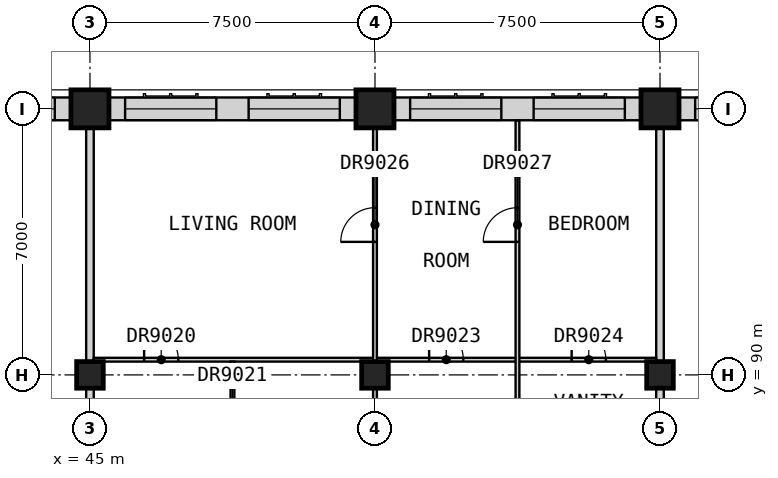
"""IFC4 building model, lengths in metres.
Left out: names, types, materials, properties, quantities, classifications, styles, units other than length and angle.
Written with IfcOpenShell. Run it as: python <this file> out.ifc"""

import sys

from ifc_helpers import new_model, si_unit, direction, frame, frame_2d, origin, origin_2d, place, context, subcontext, project, spatial, rectangle, extrude, element, fill, save


model = new_model("IFC4")
c1 = context("Model", 3, precision=1e-05, world=origin(), true_north=direction((0.0, 1.0)))
c2 = subcontext(c1, "Body", "Model", "MODEL_VIEW")
j1 = project(units=[si_unit("LENGTHUNIT", "METRE"), si_unit("PLANEANGLEUNIT", "RADIAN")], contexts=[c1])
p1 = place(None, origin())
s1 = spatial("IfcSite", under=j1, at=p1, CompositionType="ELEMENT")
p2 = place(p1, origin())
s2 = spatial("IfcBuilding", under=s1, at=p2, CompositionType="ELEMENT")
p3 = place(p2, frame((0.0, 0.0, 269.7)))
s3 = spatial("IfcBuildingStorey", under=s2, at=p3, CompositionType="ELEMENT", Elevation=269.7)
p4 = place(p3, frame((45.0, 90.0, 0.0), z_axis=(0.0, 0.0, 1.0), x_axis=(1.0, 0.0, 0.0)))
e1 = element("IfcColumn", 1, at=p4, inside=s3, PredefinedType="COLUMN", context=c2, shape_type="SweptSolid", body=[
    extrude(rectangle(XDim=0.7, YDim=0.7, at=origin_2d()), origin(), (0.0, 0.0, 1.0), 3.5),
])
p5 = place(p3, frame((45.0, 97.0, 0.0), z_axis=(0.0, 0.0, 1.0), x_axis=(1.0, 0.0, 0.0)))
e2 = element("IfcColumn", 2, at=p5, inside=s3, PredefinedType="COLUMN", context=c2, shape_type="SweptSolid", body=[
    extrude(rectangle(XDim=1.0, YDim=1.0, at=origin_2d()), origin(), (0.0, 0.0, 1.0), 3.5),
])
p6 = place(p3, frame((52.5, 90.0, 0.0), z_axis=(0.0, 0.0, 1.0), x_axis=(1.0, 0.0, 0.0)))
e3 = element("IfcColumn", 3, at=p6, inside=s3, PredefinedType="COLUMN", context=c2, shape_type="SweptSolid", body=[
    extrude(rectangle(XDim=0.7, YDim=0.7, at=origin_2d()), origin(), (0.0, 0.0, 1.0), 3.5),
])
p7 = place(p3, frame((52.5, 97.0, 0.0), z_axis=(0.0, 0.0, 1.0), x_axis=(1.0, 0.0, 0.0)))
e4 = element("IfcColumn", 4, at=p7, inside=s3, PredefinedType="COLUMN", context=c2, shape_type="SweptSolid", body=[
    extrude(rectangle(XDim=1.0, YDim=1.0, at=origin_2d()), origin(), (0.0, 0.0, 1.0), 3.5),
])
p8 = place(p3, frame((60.0, 90.0, 0.0), z_axis=(0.0, 0.0, 1.0), x_axis=(1.0, 0.0, 0.0)))
e5 = element("IfcColumn", 5, at=p8, inside=s3, PredefinedType="COLUMN", context=c2, shape_type="SweptSolid", body=[
    extrude(rectangle(XDim=0.7, YDim=0.7, at=origin_2d()), origin(), (0.0, 0.0, 1.0), 3.5),
])
p9 = place(p3, frame((60.0, 97.0, 0.0), z_axis=(0.0, 0.0, 1.0), x_axis=(1.0, 0.0, 0.0)))
e6 = element("IfcColumn", 6, at=p9, inside=s3, PredefinedType="COLUMN", context=c2, shape_type="SweptSolid", body=[
    extrude(rectangle(XDim=1.0, YDim=1.0, at=origin_2d()), origin(), (0.0, 0.0, 1.0), 3.5),
])
p10 = place(p3, frame((67.0, 97.0, 0.0), z_axis=(0.0, 0.0, 1.0), x_axis=(-1.0, 0.0, 0.0)))
e7 = element("IfcWall", 7, at=p10, inside=s3, PredefinedType="SOLIDWALL", context=c2, shape_type="SweptSolid", body=[
    extrude(rectangle(XDim=6.5, YDim=0.6, at=frame_2d((3.25, 0.0))), origin(), (0.0, 0.0, 1.0), 2.75),
])
p11 = place(p10, frame((3.675, 0.0, 0.8)))
e8 = element("IfcOpeningElement", 8, at=p11, cuts=e7, PredefinedType="OPENING", context=c2, shape_type="SweptSolid", body=[
    extrude(rectangle(XDim=2.4, YDim=1.8, at=frame_2d((1.2, 0.9))), frame((0.0, 0.31, 0.0), z_axis=(0.0, -1.0, 0.0), x_axis=(1.0, 0.0, 0.0)), (0.0, 0.0, 1.0), 0.62),
])
p12 = place(p10, frame((0.425, 0.0, 0.8)))
e9 = element("IfcOpeningElement", 9, at=p12, cuts=e7, PredefinedType="OPENING", context=c2, shape_type="SweptSolid", body=[
    extrude(rectangle(XDim=2.4, YDim=1.8, at=frame_2d((1.2, 0.9))), frame((0.0, 0.31, 0.0), z_axis=(0.0, -1.0, 0.0), x_axis=(1.0, 0.0, 0.0)), (0.0, 0.0, 1.0), 0.62),
])
p13 = place(p3, frame((59.5, 97.0, 0.0), z_axis=(0.0, 0.0, 1.0), x_axis=(-1.0, 0.0, 0.0)))
e10 = element("IfcWall", 10, at=p13, inside=s3, PredefinedType="SOLIDWALL", context=c2, shape_type="SweptSolid", body=[
    extrude(rectangle(XDim=6.5, YDim=0.6, at=frame_2d((3.25, 0.0))), origin(), (0.0, 0.0, 1.0), 2.75),
])
p14 = place(p13, frame((3.675, 0.0, 0.8)))
e11 = element("IfcOpeningElement", 11, at=p14, cuts=e10, PredefinedType="OPENING", context=c2, shape_type="SweptSolid", body=[
    extrude(rectangle(XDim=2.4, YDim=1.8, at=frame_2d((1.2, 0.9))), frame((0.0, 0.31, 0.0), z_axis=(0.0, -1.0, 0.0), x_axis=(1.0, 0.0, 0.0)), (0.0, 0.0, 1.0), 0.62),
])
p15 = place(p13, frame((0.425, 0.0, 0.8)))
e12 = element("IfcOpeningElement", 12, at=p15, cuts=e10, PredefinedType="OPENING", context=c2, shape_type="SweptSolid", body=[
    extrude(rectangle(XDim=2.4, YDim=1.8, at=frame_2d((1.2, 0.9))), frame((0.0, 0.31, 0.0), z_axis=(0.0, -1.0, 0.0), x_axis=(1.0, 0.0, 0.0)), (0.0, 0.0, 1.0), 0.62),
])
p16 = place(p3, frame((52.0, 97.0, 0.0), z_axis=(0.0, 0.0, 1.0), x_axis=(-1.0, 0.0, 0.0)))
e13 = element("IfcWall", 13, at=p16, inside=s3, PredefinedType="SOLIDWALL", context=c2, shape_type="SweptSolid", body=[
    extrude(rectangle(XDim=6.5, YDim=0.6, at=frame_2d((3.25, 0.0))), origin(), (0.0, 0.0, 1.0), 2.75),
])
p17 = place(p16, frame((3.675, 0.0, 0.8)))
e14 = element("IfcOpeningElement", 14, at=p17, cuts=e13, PredefinedType="OPENING", context=c2, shape_type="SweptSolid", body=[
    extrude(rectangle(XDim=2.4, YDim=1.8, at=frame_2d((1.2, 0.9))), frame((0.0, 0.31, 0.0), z_axis=(0.0, -1.0, 0.0), x_axis=(1.0, 0.0, 0.0)), (0.0, 0.0, 1.0), 0.62),
])
p18 = place(p16, frame((0.425, 0.0, 0.8)))
e15 = element("IfcOpeningElement", 15, at=p18, cuts=e13, PredefinedType="OPENING", context=c2, shape_type="SweptSolid", body=[
    extrude(rectangle(XDim=2.4, YDim=1.8, at=frame_2d((1.2, 0.9))), frame((0.0, 0.31, 0.0), z_axis=(0.0, -1.0, 0.0), x_axis=(1.0, 0.0, 0.0)), (0.0, 0.0, 1.0), 0.62),
])
p19 = place(p3, frame((44.5, 97.0, 0.0), z_axis=(0.0, 0.0, 1.0), x_axis=(-1.0, 0.0, 0.0)))
e16 = element("IfcWall", 16, at=p19, inside=s3, PredefinedType="SOLIDWALL", context=c2, shape_type="SweptSolid", body=[
    extrude(rectangle(XDim=6.5, YDim=0.6, at=frame_2d((3.25, 0.0))), origin(), (0.0, 0.0, 1.0), 2.75),
])
p20 = place(p19, frame((3.675, 0.0, 0.8)))
e17 = element("IfcOpeningElement", 17, at=p20, cuts=e16, PredefinedType="OPENING", context=c2, shape_type="SweptSolid", body=[
    extrude(rectangle(XDim=2.4, YDim=1.8, at=frame_2d((1.2, 0.9))), frame((0.0, 0.31, 0.0), z_axis=(0.0, -1.0, 0.0), x_axis=(1.0, 0.0, 0.0)), (0.0, 0.0, 1.0), 0.62),
])
p21 = place(p19, frame((0.425, 0.0, 0.8)))
e18 = element("IfcOpeningElement", 18, at=p21, cuts=e16, PredefinedType="OPENING", context=c2, shape_type="SweptSolid", body=[
    extrude(rectangle(XDim=2.4, YDim=1.8, at=frame_2d((1.2, 0.9))), frame((0.0, 0.31, 0.0), z_axis=(0.0, -1.0, 0.0), x_axis=(1.0, 0.0, 0.0)), (0.0, 0.0, 1.0), 0.62),
])
for number, where, z_axis, x_axis in (
    (19, (45.0, 84.375, 0.0), (0.0, 0.0, 1.0), (0.0, 1.0, 0.0)),
    (20, (60.0, 84.375, 0.0), (0.0, 0.0, 1.0), (0.0, 1.0, 0.0)),
):
    element("IfcWall", number, at=place(p3, frame(where, z_axis=z_axis, x_axis=x_axis)), inside=s3, PredefinedType="PARTITIONING", context=c2, shape_type="SweptSolid", body=[
        extrude(rectangle(XDim=13.125, YDim=0.2, at=frame_2d((6.562, 0.0))), origin(), (0.0, 0.0, 1.0), 3.25),
    ])
p22 = place(p3, frame((45.1, 90.4, 0.0), z_axis=(0.0, 0.0, 1.0), x_axis=(1.0, 0.0, 0.0)))
e21 = element("IfcWall", 21, at=p22, inside=s3, PredefinedType="PARTITIONING", context=c2, shape_type="SweptSolid", body=[
    extrude(rectangle(XDim=14.8, YDim=0.1, at=frame_2d((7.4, 0.0))), origin(), (0.0, 0.0, 1.0), 3.25),
])
p23 = place(p22, frame((1.325, 0.0, 0.0)))
e22 = element("IfcOpeningElement", 22, at=p23, cuts=e21, PredefinedType="OPENING", context=c2, shape_type="SweptSolid", body=[
    extrude(rectangle(XDim=0.9, YDim=2.1, at=frame_2d((0.45, 1.05))), frame((0.0, 0.06, 0.0), z_axis=(0.0, -1.0, 0.0), x_axis=(1.0, 0.0, 0.0)), (0.0, 0.0, 1.0), 0.12),
])
p24 = place(p22, frame((8.825, 0.0, 0.0)))
e23 = element("IfcOpeningElement", 23, at=p24, cuts=e21, PredefinedType="OPENING", context=c2, shape_type="SweptSolid", body=[
    extrude(rectangle(XDim=0.9, YDim=2.1, at=frame_2d((0.45, 1.05))), frame((0.0, 0.06, 0.0), z_axis=(0.0, -1.0, 0.0), x_axis=(1.0, 0.0, 0.0)), (0.0, 0.0, 1.0), 0.12),
])
p25 = place(p22, frame((12.575, 0.0, 0.0)))
e24 = element("IfcOpeningElement", 24, at=p25, cuts=e21, PredefinedType="OPENING", context=c2, shape_type="SweptSolid", body=[
    extrude(rectangle(XDim=0.9, YDim=2.1, at=frame_2d((0.45, 1.05))), frame((0.0, 0.06, 0.0), z_axis=(0.0, -1.0, 0.0), x_axis=(1.0, 0.0, 0.0)), (0.0, 0.0, 1.0), 0.12),
])
p26 = place(p3, frame((48.75, 87.413, 0.0), z_axis=(0.0, 0.0, 1.0), x_axis=(0.0, 1.0, 0.0)))
e25 = element("IfcWall", 25, at=p26, inside=s3, PredefinedType="PARTITIONING", context=c2, shape_type="SweptSolid", body=[
    extrude(rectangle(XDim=2.938, YDim=0.1, at=frame_2d((1.469, 0.0))), origin(), (0.0, 0.0, 1.0), 3.25),
])
p27 = place(p26, frame((1.012, 0.0, 0.0)))
e26 = element("IfcOpeningElement", 26, at=p27, cuts=e25, PredefinedType="OPENING", context=c2, shape_type="SweptSolid", body=[
    extrude(rectangle(XDim=0.9, YDim=2.1, at=frame_2d((0.45, 1.05))), frame((0.0, 0.06, 0.0), z_axis=(0.0, -1.0, 0.0), x_axis=(1.0, 0.0, 0.0)), (0.0, 0.0, 1.0), 0.12),
])
p28 = place(p3, frame((52.5, 87.413, 0.0), z_axis=(0.0, 0.0, 1.0), x_axis=(0.0, 1.0, 0.0)))
e27 = element("IfcWall", 27, at=p28, inside=s3, PredefinedType="PARTITIONING", context=c2, shape_type="SweptSolid", body=[
    extrude(rectangle(XDim=10.087, YDim=0.1, at=frame_2d((5.044, 0.0))), origin(), (0.0, 0.0, 1.0), 3.25),
])
p29 = place(p28, frame((6.087, 0.0, 0.0)))
e28 = element("IfcOpeningElement", 28, at=p29, cuts=e27, PredefinedType="OPENING", context=c2, shape_type="SweptSolid", body=[
    extrude(rectangle(XDim=0.9, YDim=2.1, at=frame_2d((0.45, 1.05))), frame((0.0, 0.06, 0.0), z_axis=(0.0, -1.0, 0.0), x_axis=(1.0, 0.0, 0.0)), (0.0, 0.0, 1.0), 0.12),
])
p30 = place(p3, frame((56.25, 87.413, 0.0), z_axis=(0.0, 0.0, 1.0), x_axis=(0.0, 1.0, 0.0)))
e29 = element("IfcWall", 29, at=p30, inside=s3, PredefinedType="PARTITIONING", context=c2, shape_type="SweptSolid", body=[
    extrude(rectangle(XDim=9.277, YDim=0.1, at=frame_2d((4.639, 0.0))), origin(), (0.0, 0.0, 1.0), 3.25),
])
p31 = place(p30, frame((6.087, 0.0, 0.0)))
e30 = element("IfcOpeningElement", 30, at=p31, cuts=e29, PredefinedType="OPENING", context=c2, shape_type="SweptSolid", body=[
    extrude(rectangle(XDim=0.9, YDim=2.1, at=frame_2d((0.45, 1.05))), frame((0.0, 0.06, 0.0), z_axis=(0.0, -1.0, 0.0), x_axis=(1.0, 0.0, 0.0)), (0.0, 0.0, 1.0), 0.12),
])
p32 = place(p11, origin())
e31 = element("IfcWindow", 31, at=p32, inside=s3, PartitioningType="SINGLE_PANEL", PredefinedType="WINDOW", context=c2, shape_type="SweptSolid", body=[
    extrude(rectangle(XDim=2.4, YDim=1.8, at=frame_2d((1.2, 0.9))), frame((0.0, -0.07, 0.0), z_axis=(0.0, -1.0, 0.0), x_axis=(1.0, 0.0, 0.0)), (0.0, 0.0, 1.0), 0.06),
])
fill(e8, e31)
p33 = place(p14, origin())
e32 = element("IfcWindow", 32, at=p33, inside=s3, PartitioningType="SINGLE_PANEL", PredefinedType="WINDOW", context=c2, shape_type="SweptSolid", body=[
    extrude(rectangle(XDim=2.4, YDim=1.8, at=frame_2d((1.2, 0.9))), frame((0.0, -0.07, 0.0), z_axis=(0.0, -1.0, 0.0), x_axis=(1.0, 0.0, 0.0)), (0.0, 0.0, 1.0), 0.06),
])
fill(e11, e32)
p34 = place(p15, origin())
e33 = element("IfcWindow", 33, at=p34, inside=s3, PartitioningType="SINGLE_PANEL", PredefinedType="WINDOW", context=c2, shape_type="SweptSolid", body=[
    extrude(rectangle(XDim=2.4, YDim=1.8, at=frame_2d((1.2, 0.9))), frame((0.0, -0.07, 0.0), z_axis=(0.0, -1.0, 0.0), x_axis=(1.0, 0.0, 0.0)), (0.0, 0.0, 1.0), 0.06),
])
fill(e12, e33)
p35 = place(p17, origin())
e34 = element("IfcWindow", 34, at=p35, inside=s3, PartitioningType="SINGLE_PANEL", PredefinedType="WINDOW", context=c2, shape_type="SweptSolid", body=[
    extrude(rectangle(XDim=2.4, YDim=1.8, at=frame_2d((1.2, 0.9))), frame((0.0, -0.07, 0.0), z_axis=(0.0, -1.0, 0.0), x_axis=(1.0, 0.0, 0.0)), (0.0, 0.0, 1.0), 0.06),
])
fill(e14, e34)
p36 = place(p18, origin())
e35 = element("IfcWindow", 35, at=p36, inside=s3, PartitioningType="SINGLE_PANEL", PredefinedType="WINDOW", context=c2, shape_type="SweptSolid", body=[
    extrude(rectangle(XDim=2.4, YDim=1.8, at=frame_2d((1.2, 0.9))), frame((0.0, -0.07, 0.0), z_axis=(0.0, -1.0, 0.0), x_axis=(1.0, 0.0, 0.0)), (0.0, 0.0, 1.0), 0.06),
])
fill(e15, e35)
p37 = place(p21, origin())
e36 = element("IfcWindow", 36, at=p37, inside=s3, PartitioningType="SINGLE_PANEL", PredefinedType="WINDOW", context=c2, shape_type="SweptSolid", body=[
    extrude(rectangle(XDim=2.4, YDim=1.8, at=frame_2d((1.2, 0.9))), frame((0.0, -0.07, 0.0), z_axis=(0.0, -1.0, 0.0), x_axis=(1.0, 0.0, 0.0)), (0.0, 0.0, 1.0), 0.06),
])
fill(e18, e36)
p38 = place(p23, origin())
e37 = element("IfcDoor", 37, at=p38, inside=s3, OperationType="SINGLE_SWING_RIGHT", PredefinedType="DOOR", context=c2, shape_type="SweptSolid", body=[
    extrude(rectangle(XDim=0.9, YDim=2.1, at=frame_2d((0.45, 1.05))), frame((0.0, 0.025, 0.0), z_axis=(0.0, -1.0, 0.0), x_axis=(1.0, 0.0, 0.0)), (0.0, 0.0, 1.0), 0.05),
])
fill(e22, e37)
p39 = place(p24, origin())
e38 = element("IfcDoor", 38, at=p39, inside=s3, OperationType="SINGLE_SWING_RIGHT", PredefinedType="DOOR", context=c2, shape_type="SweptSolid", body=[
    extrude(rectangle(XDim=0.9, YDim=2.1, at=frame_2d((0.45, 1.05))), frame((0.0, 0.025, 0.0), z_axis=(0.0, -1.0, 0.0), x_axis=(1.0, 0.0, 0.0)), (0.0, 0.0, 1.0), 0.05),
])
fill(e23, e38)
p40 = place(p25, origin())
e39 = element("IfcDoor", 39, at=p40, inside=s3, OperationType="SINGLE_SWING_RIGHT", PredefinedType="DOOR", context=c2, shape_type="SweptSolid", body=[
    extrude(rectangle(XDim=0.9, YDim=2.1, at=frame_2d((0.45, 1.05))), frame((0.0, 0.025, 0.0), z_axis=(0.0, -1.0, 0.0), x_axis=(1.0, 0.0, 0.0)), (0.0, 0.0, 1.0), 0.05),
])
fill(e24, e39)
p41 = place(p29, origin())
e40 = element("IfcDoor", 40, at=p41, inside=s3, OperationType="SINGLE_SWING_RIGHT", PredefinedType="DOOR", context=c2, shape_type="SweptSolid", body=[
    extrude(rectangle(XDim=0.9, YDim=2.1, at=frame_2d((0.45, 1.05))), frame((0.0, 0.025, 0.0), z_axis=(0.0, -1.0, 0.0), x_axis=(1.0, 0.0, 0.0)), (0.0, 0.0, 1.0), 0.05),
])
fill(e28, e40)
p42 = place(p31, origin())
e41 = element("IfcDoor", 41, at=p42, inside=s3, OperationType="SINGLE_SWING_RIGHT", PredefinedType="DOOR", context=c2, shape_type="SweptSolid", body=[
    extrude(rectangle(XDim=0.9, YDim=2.1, at=frame_2d((0.45, 1.05))), frame((0.0, 0.025, 0.0), z_axis=(0.0, -1.0, 0.0), x_axis=(1.0, 0.0, 0.0)), (0.0, 0.0, 1.0), 0.05),
])
fill(e30, e41)
save(model, sys.argv[1])
